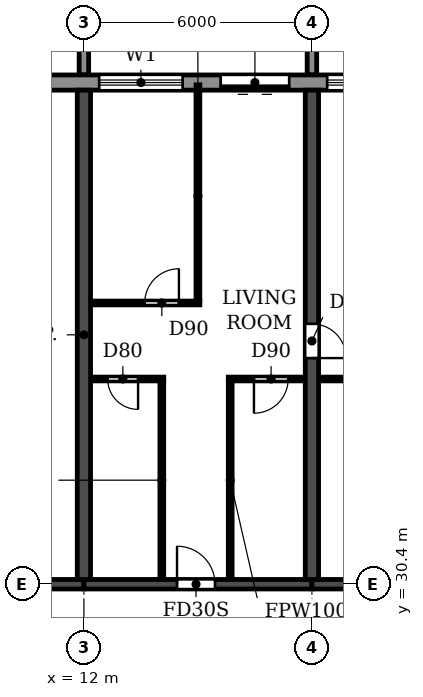
"""IFC4 building model, lengths in metres.
Left out: names, types, materials, properties, quantities, classifications, styles, units other than length and angle.
Written with IfcOpenShell. Run it as: python <this file> out.ifc"""

import sys

from ifc_helpers import new_model, si_unit, direction, frame, frame_2d, origin, place, context, subcontext, project, spatial, polyline, rectangle, outline, extrude, source, transform, mapped, element, fill, save


model = new_model("IFC4")
c1 = context("Model", 3, precision=1e-05, world=origin(), true_north=direction((0.0, 1.0)))
c2 = subcontext(c1, "Body", "Model", "MODEL_VIEW")
j1 = project(units=[si_unit("LENGTHUNIT", "METRE"), si_unit("PLANEANGLEUNIT", "RADIAN")], contexts=[c1])
p1 = place(None, origin())
s1 = spatial("IfcSite", under=j1, at=p1, CompositionType="ELEMENT")
p2 = place(p1, origin())
s2 = spatial("IfcBuilding", under=s1, at=p2, CompositionType="ELEMENT")
p3 = place(p2, frame((0.0, 0.0, 102.6)))
s3 = spatial("IfcBuildingStorey", under=s2, at=p3, CompositionType="ELEMENT", Elevation=102.6)
p4 = place(p3, frame((12.0, 30.525, 0.0), z_axis=(0.0, 0.0, 1.0), x_axis=(0.0, 1.0, 0.0)))
e1 = element("IfcWall", 1, at=p4, inside=s3, PredefinedType="SHEAR", context=c2, shape_type="SweptSolid", body=[
    extrude(rectangle(XDim=12.875, YDim=0.35, at=frame_2d((6.438, 0.0))), origin(), (0.0, 0.0, 1.0), 3.0),
])
p5 = place(p3, frame((18.0, 30.525, 0.0), z_axis=(0.0, 0.0, 1.0), x_axis=(0.0, 1.0, 0.0)))
e2 = element("IfcWall", 2, at=p5, inside=s3, PredefinedType="SHEAR", context=c2, shape_type="SweptSolid", body=[
    extrude(rectangle(XDim=12.875, YDim=0.35, at=frame_2d((6.438, 0.0))), origin(), (0.0, 0.0, 1.0), 3.0),
])
p6 = place(p5, frame((5.825, 0.0, 0.0)))
e3 = element("IfcOpeningElement", 3, at=p6, cuts=e2, PredefinedType="OPENING", context=c2, shape_type="SweptSolid", body=[
    extrude(rectangle(XDim=0.9, YDim=2.1, at=frame_2d((0.45, 1.05))), frame((0.0, 0.185, 0.0), z_axis=(0.0, -1.0, 0.0), x_axis=(1.0, 0.0, 0.0)), (0.0, 0.0, 1.0), 0.37),
])
p7 = place(p3, frame((6.2, 30.4, 0.0), z_axis=(0.0, 0.0, 1.0), x_axis=(1.0, 0.0, 0.0)))
e4 = element("IfcWall", 4, at=p7, inside=s3, PredefinedType="SHEAR", context=c2, shape_type="SweptSolid", body=[
    extrude(rectangle(XDim=5.8, YDim=0.25, at=frame_2d((2.9, 0.0))), origin(), (0.0, 0.0, 1.0), 2.4),
])
p8 = place(p7, frame((2.3, 0.0, 0.0)))
e5 = element("IfcOpeningElement", 5, at=p8, cuts=e4, PredefinedType="OPENING", context=c2, shape_type="SweptSolid", body=[
    extrude(rectangle(XDim=1.0, YDim=2.1, at=frame_2d((0.5, 1.05))), frame((0.0, 0.135, 0.0), z_axis=(0.0, -1.0, 0.0), x_axis=(1.0, 0.0, 0.0)), (0.0, 0.0, 1.0), 0.27),
])
p9 = place(p3, frame((12.0, 30.4, 0.0), z_axis=(0.0, 0.0, 1.0), x_axis=(1.0, 0.0, 0.0)))
e6 = element("IfcWall", 6, at=p9, inside=s3, PredefinedType="SHEAR", context=c2, shape_type="SweptSolid", body=[
    extrude(rectangle(XDim=6.0, YDim=0.25, at=frame_2d((3.0, 0.0))), origin(), (0.0, 0.0, 1.0), 2.4),
])
p10 = place(p9, frame((2.45, 0.0, 0.0)))
e7 = element("IfcOpeningElement", 7, at=p10, cuts=e6, PredefinedType="OPENING", context=c2, shape_type="SweptSolid", body=[
    extrude(rectangle(XDim=1.0, YDim=2.1, at=frame_2d((0.5, 1.05))), frame((0.0, 0.135, 0.0), z_axis=(0.0, -1.0, 0.0), x_axis=(1.0, 0.0, 0.0)), (0.0, 0.0, 1.0), 0.27),
])
p11 = place(p3, frame((18.0, 30.4, 0.0), z_axis=(0.0, 0.0, 1.0), x_axis=(1.0, 0.0, 0.0)))
e8 = element("IfcWall", 8, at=p11, inside=s3, PredefinedType="SHEAR", context=c2, shape_type="SweptSolid", body=[
    extrude(rectangle(XDim=6.0, YDim=0.25, at=frame_2d((3.0, 0.0))), origin(), (0.0, 0.0, 1.0), 2.4),
])
p12 = place(p3, frame((91.317, 43.6, 0.0), z_axis=(0.0, 0.0, 1.0), x_axis=(-1.0, 0.0, 0.0)))
e9 = element("IfcWall", 9, at=p12, inside=s3, PredefinedType="STANDARD", context=c2, shape_type="SweptSolid", body=[
    extrude(rectangle(XDim=80.634, YDim=0.4, at=frame_2d((40.317, 0.0))), origin(), (0.0, 0.0, 1.0), 3.0),
])
p13 = place(p12, frame((76.717, 0.0, 0.9)))
e10 = element("IfcOpeningElement", 10, at=p13, cuts=e9, PredefinedType="OPENING", context=c2, shape_type="SweptSolid", body=[
    extrude(rectangle(XDim=2.2, YDim=1.5, at=frame_2d((1.1, 0.75))), frame((0.0, 0.21, 0.0), z_axis=(0.0, -1.0, 0.0), x_axis=(1.0, 0.0, 0.0)), (0.0, 0.0, 1.0), 0.42),
])
p14 = place(p12, frame((73.917, 0.0, 0.0)))
e11 = element("IfcOpeningElement", 11, at=p14, cuts=e9, PredefinedType="OPENING", context=c2, shape_type="SweptSolid", body=[
    extrude(rectangle(XDim=1.8, YDim=2.4, at=frame_2d((0.9, 1.2))), frame((0.0, 0.21, 0.0), z_axis=(0.0, -1.0, 0.0), x_axis=(1.0, 0.0, 0.0)), (0.0, 0.0, 1.0), 0.42),
])
p15 = place(p12, frame((70.717, 0.0, 0.9)))
e12 = element("IfcOpeningElement", 12, at=p15, cuts=e9, PredefinedType="OPENING", context=c2, shape_type="SweptSolid", body=[
    extrude(rectangle(XDim=2.2, YDim=1.5, at=frame_2d((1.1, 0.75))), frame((0.0, 0.21, 0.0), z_axis=(0.0, -1.0, 0.0), x_axis=(1.0, 0.0, 0.0)), (0.0, 0.0, 1.0), 0.42),
])
p16 = place(p12, frame((67.717, 0.0, 0.9)))
e13 = element("IfcOpeningElement", 13, at=p16, cuts=e9, PredefinedType="OPENING", context=c2, shape_type="SweptSolid", body=[
    extrude(rectangle(XDim=2.2, YDim=1.5, at=frame_2d((1.1, 0.75))), frame((0.0, 0.21, 0.0), z_axis=(0.0, -1.0, 0.0), x_axis=(1.0, 0.0, 0.0)), (0.0, 0.0, 1.0), 0.42),
])
p17 = place(p12, frame((64.917, 0.0, 0.0)))
e14 = element("IfcOpeningElement", 14, at=p17, cuts=e9, PredefinedType="OPENING", context=c2, shape_type="SweptSolid", body=[
    extrude(rectangle(XDim=1.8, YDim=2.4, at=frame_2d((0.9, 1.2))), frame((0.0, 0.21, 0.0), z_axis=(0.0, -1.0, 0.0), x_axis=(1.0, 0.0, 0.0)), (0.0, 0.0, 1.0), 0.42),
])
p18 = place(p12, frame((61.717, 0.0, 0.9)))
e15 = element("IfcOpeningElement", 15, at=p18, cuts=e9, PredefinedType="OPENING", context=c2, shape_type="SweptSolid", body=[
    extrude(rectangle(XDim=2.2, YDim=1.5, at=frame_2d((1.1, 0.75))), frame((0.0, 0.21, 0.0), z_axis=(0.0, -1.0, 0.0), x_axis=(1.0, 0.0, 0.0)), (0.0, 0.0, 1.0), 0.42),
])
p19 = place(p12, frame((58.717, 0.0, 0.9)))
e16 = element("IfcOpeningElement", 16, at=p19, cuts=e9, PredefinedType="OPENING", context=c2, shape_type="SweptSolid", body=[
    extrude(rectangle(XDim=2.2, YDim=1.5, at=frame_2d((1.1, 0.75))), frame((0.0, 0.21, 0.0), z_axis=(0.0, -1.0, 0.0), x_axis=(1.0, 0.0, 0.0)), (0.0, 0.0, 1.0), 0.42),
])
p20 = place(p12, frame((55.717, 0.0, 0.9)))
e17 = element("IfcOpeningElement", 17, at=p20, cuts=e9, PredefinedType="OPENING", context=c2, shape_type="SweptSolid", body=[
    extrude(rectangle(XDim=2.2, YDim=1.5, at=frame_2d((1.1, 0.75))), frame((0.0, 0.21, 0.0), z_axis=(0.0, -1.0, 0.0), x_axis=(1.0, 0.0, 0.0)), (0.0, 0.0, 1.0), 0.42),
])
p21 = place(p12, frame((52.717, 0.0, 0.9)))
e18 = element("IfcOpeningElement", 18, at=p21, cuts=e9, PredefinedType="OPENING", context=c2, shape_type="SweptSolid", body=[
    extrude(rectangle(XDim=2.2, YDim=1.5, at=frame_2d((1.1, 0.75))), frame((0.0, 0.21, 0.0), z_axis=(0.0, -1.0, 0.0), x_axis=(1.0, 0.0, 0.0)), (0.0, 0.0, 1.0), 0.42),
])
p22 = place(p12, frame((49.917, 0.0, 0.0)))
e19 = element("IfcOpeningElement", 19, at=p22, cuts=e9, PredefinedType="OPENING", context=c2, shape_type="SweptSolid", body=[
    extrude(rectangle(XDim=1.8, YDim=2.4, at=frame_2d((0.9, 1.2))), frame((0.0, 0.21, 0.0), z_axis=(0.0, -1.0, 0.0), x_axis=(1.0, 0.0, 0.0)), (0.0, 0.0, 1.0), 0.42),
])
p23 = place(p12, frame((46.717, 0.0, 0.9)))
e20 = element("IfcOpeningElement", 20, at=p23, cuts=e9, PredefinedType="OPENING", context=c2, shape_type="SweptSolid", body=[
    extrude(rectangle(XDim=2.2, YDim=1.5, at=frame_2d((1.1, 0.75))), frame((0.0, 0.21, 0.0), z_axis=(0.0, -1.0, 0.0), x_axis=(1.0, 0.0, 0.0)), (0.0, 0.0, 1.0), 0.42),
])
p24 = place(p12, frame((43.917, 0.0, 0.0)))
e21 = element("IfcOpeningElement", 21, at=p24, cuts=e9, PredefinedType="OPENING", context=c2, shape_type="SweptSolid", body=[
    extrude(rectangle(XDim=1.8, YDim=2.4, at=frame_2d((0.9, 1.2))), frame((0.0, 0.21, 0.0), z_axis=(0.0, -1.0, 0.0), x_axis=(1.0, 0.0, 0.0)), (0.0, 0.0, 1.0), 0.42),
])
p25 = place(p12, frame((40.717, 0.0, 0.9)))
e22 = element("IfcOpeningElement", 22, at=p25, cuts=e9, PredefinedType="OPENING", context=c2, shape_type="SweptSolid", body=[
    extrude(rectangle(XDim=2.2, YDim=1.5, at=frame_2d((1.1, 0.75))), frame((0.0, 0.21, 0.0), z_axis=(0.0, -1.0, 0.0), x_axis=(1.0, 0.0, 0.0)), (0.0, 0.0, 1.0), 0.42),
])
p26 = place(p12, frame((37.717, 0.0, 0.9)))
e23 = element("IfcOpeningElement", 23, at=p26, cuts=e9, PredefinedType="OPENING", context=c2, shape_type="SweptSolid", body=[
    extrude(rectangle(XDim=2.2, YDim=1.5, at=frame_2d((1.1, 0.75))), frame((0.0, 0.21, 0.0), z_axis=(0.0, -1.0, 0.0), x_axis=(1.0, 0.0, 0.0)), (0.0, 0.0, 1.0), 0.42),
])
p27 = place(p12, frame((34.917, 0.0, 0.0)))
e24 = element("IfcOpeningElement", 24, at=p27, cuts=e9, PredefinedType="OPENING", context=c2, shape_type="SweptSolid", body=[
    extrude(rectangle(XDim=1.8, YDim=2.4, at=frame_2d((0.9, 1.2))), frame((0.0, 0.21, 0.0), z_axis=(0.0, -1.0, 0.0), x_axis=(1.0, 0.0, 0.0)), (0.0, 0.0, 1.0), 0.42),
])
p28 = place(p12, frame((31.717, 0.0, 0.9)))
e25 = element("IfcOpeningElement", 25, at=p28, cuts=e9, PredefinedType="OPENING", context=c2, shape_type="SweptSolid", body=[
    extrude(rectangle(XDim=2.2, YDim=1.5, at=frame_2d((1.1, 0.75))), frame((0.0, 0.21, 0.0), z_axis=(0.0, -1.0, 0.0), x_axis=(1.0, 0.0, 0.0)), (0.0, 0.0, 1.0), 0.42),
])
p29 = place(p12, frame((28.717, 0.0, 0.9)))
e26 = element("IfcOpeningElement", 26, at=p29, cuts=e9, PredefinedType="OPENING", context=c2, shape_type="SweptSolid", body=[
    extrude(rectangle(XDim=2.2, YDim=1.5, at=frame_2d((1.1, 0.75))), frame((0.0, 0.21, 0.0), z_axis=(0.0, -1.0, 0.0), x_axis=(1.0, 0.0, 0.0)), (0.0, 0.0, 1.0), 0.42),
])
p30 = place(p12, frame((25.917, 0.0, 0.0)))
e27 = element("IfcOpeningElement", 27, at=p30, cuts=e9, PredefinedType="OPENING", context=c2, shape_type="SweptSolid", body=[
    extrude(rectangle(XDim=1.8, YDim=2.4, at=frame_2d((0.9, 1.2))), frame((0.0, 0.21, 0.0), z_axis=(0.0, -1.0, 0.0), x_axis=(1.0, 0.0, 0.0)), (0.0, 0.0, 1.0), 0.42),
])
p31 = place(p12, frame((22.717, 0.0, 0.9)))
e28 = element("IfcOpeningElement", 28, at=p31, cuts=e9, PredefinedType="OPENING", context=c2, shape_type="SweptSolid", body=[
    extrude(rectangle(XDim=2.2, YDim=1.5, at=frame_2d((1.1, 0.75))), frame((0.0, 0.21, 0.0), z_axis=(0.0, -1.0, 0.0), x_axis=(1.0, 0.0, 0.0)), (0.0, 0.0, 1.0), 0.42),
])
p32 = place(p12, frame((19.717, 0.0, 0.9)))
e29 = element("IfcOpeningElement", 29, at=p32, cuts=e9, PredefinedType="OPENING", context=c2, shape_type="SweptSolid", body=[
    extrude(rectangle(XDim=2.2, YDim=1.5, at=frame_2d((1.1, 0.75))), frame((0.0, 0.21, 0.0), z_axis=(0.0, -1.0, 0.0), x_axis=(1.0, 0.0, 0.0)), (0.0, 0.0, 1.0), 0.42),
])
p33 = place(p12, frame((16.917, 0.0, 0.0)))
e30 = element("IfcOpeningElement", 30, at=p33, cuts=e9, PredefinedType="OPENING", context=c2, shape_type="SweptSolid", body=[
    extrude(rectangle(XDim=1.8, YDim=2.4, at=frame_2d((0.9, 1.2))), frame((0.0, 0.21, 0.0), z_axis=(0.0, -1.0, 0.0), x_axis=(1.0, 0.0, 0.0)), (0.0, 0.0, 1.0), 0.42),
])
p34 = place(p12, frame((13.717, 0.0, 0.9)))
e31 = element("IfcOpeningElement", 31, at=p34, cuts=e9, PredefinedType="OPENING", context=c2, shape_type="SweptSolid", body=[
    extrude(rectangle(XDim=2.2, YDim=1.5, at=frame_2d((1.1, 0.75))), frame((0.0, 0.21, 0.0), z_axis=(0.0, -1.0, 0.0), x_axis=(1.0, 0.0, 0.0)), (0.0, 0.0, 1.0), 0.42),
])
p35 = place(p12, frame((10.917, 0.0, 0.0)))
e32 = element("IfcOpeningElement", 32, at=p35, cuts=e9, PredefinedType="OPENING", context=c2, shape_type="SweptSolid", body=[
    extrude(rectangle(XDim=1.8, YDim=2.4, at=frame_2d((0.9, 1.2))), frame((0.0, 0.21, 0.0), z_axis=(0.0, -1.0, 0.0), x_axis=(1.0, 0.0, 0.0)), (0.0, 0.0, 1.0), 0.42),
])
p36 = place(p12, frame((7.717, 0.0, 0.9)))
e33 = element("IfcOpeningElement", 33, at=p36, cuts=e9, PredefinedType="OPENING", context=c2, shape_type="SweptSolid", body=[
    extrude(rectangle(XDim=2.2, YDim=1.5, at=frame_2d((1.1, 0.75))), frame((0.0, 0.21, 0.0), z_axis=(0.0, -1.0, 0.0), x_axis=(1.0, 0.0, 0.0)), (0.0, 0.0, 1.0), 0.42),
])
p37 = place(p12, frame((4.717, 0.0, 0.9)))
e34 = element("IfcOpeningElement", 34, at=p37, cuts=e9, PredefinedType="OPENING", context=c2, shape_type="SweptSolid", body=[
    extrude(rectangle(XDim=2.2, YDim=1.5, at=frame_2d((1.1, 0.75))), frame((0.0, 0.21, 0.0), z_axis=(0.0, -1.0, 0.0), x_axis=(1.0, 0.0, 0.0)), (0.0, 0.0, 1.0), 0.42),
])
p38 = place(p12, frame((1.917, 0.0, 0.0)))
e35 = element("IfcOpeningElement", 35, at=p38, cuts=e9, PredefinedType="OPENING", context=c2, shape_type="SweptSolid", body=[
    extrude(rectangle(XDim=1.8, YDim=2.4, at=frame_2d((0.9, 1.2))), frame((0.0, 0.21, 0.0), z_axis=(0.0, -1.0, 0.0), x_axis=(1.0, 0.0, 0.0)), (0.0, 0.0, 1.0), 0.42),
])
m1 = source(origin(), c2, "Body", "SweptSolid", [
    extrude(outline(polyline([(0.0, 0.0), (0.25, 0.0), (0.25, 3.1), (0.0, 3.1), (0.0, 0.0)])), origin(), (0.0, 0.0, 1.0), 3.1),
])
for number, where in (
    (36, (11.875, 43.8, 0.0)),
    (37, (17.875, 43.8, 0.0)),
):
    element("IfcWall", number, at=place(p3, frame(where)), inside=s3, PredefinedType="STANDARD", context=c2, shape_type="MappedRepresentation", body=[
        mapped(m1, transform((0.0, 0.0, 0.0))),
    ])
p39 = place(p3, frame((12.185, 35.8, 0.0), z_axis=(0.0, 0.0, 1.0), x_axis=(1.0, 0.0, 0.0)))
e38 = element("IfcWall", 38, at=p39, inside=s3, PredefinedType="PARTITIONING", context=c2, shape_type="SweptSolid", body=[
    extrude(rectangle(XDim=1.915, YDim=0.1, at=frame_2d((0.958, 0.0))), origin(), (0.0, 0.0, 1.0), 3.0),
])
p40 = place(p39, frame((0.44, 0.0, 0.0)))
e39 = element("IfcOpeningElement", 39, at=p40, cuts=e38, PredefinedType="OPENING", context=c2, shape_type="SweptSolid", body=[
    extrude(rectangle(XDim=0.8, YDim=2.1, at=frame_2d((0.4, 1.05))), frame((0.0, 0.06, 0.0), z_axis=(0.0, -1.0, 0.0), x_axis=(1.0, 0.0, 0.0)), (0.0, 0.0, 1.0), 0.12),
])
p41 = place(p3, frame((15.8, 35.8, 0.0), z_axis=(0.0, 0.0, 1.0), x_axis=(1.0, 0.0, 0.0)))
e40 = element("IfcWall", 40, at=p41, inside=s3, PredefinedType="PARTITIONING", context=c2, shape_type="SweptSolid", body=[
    extrude(rectangle(XDim=2.015, YDim=0.1, at=frame_2d((1.007, 0.0))), origin(), (0.0, 0.0, 1.0), 3.0),
])
p42 = place(p41, frame((0.675, 0.0, 0.0)))
e41 = element("IfcOpeningElement", 41, at=p42, cuts=e40, PredefinedType="OPENING", context=c2, shape_type="SweptSolid", body=[
    extrude(rectangle(XDim=0.9, YDim=2.1, at=frame_2d((0.45, 1.05))), frame((0.0, 0.06, 0.0), z_axis=(0.0, -1.0, 0.0), x_axis=(1.0, 0.0, 0.0)), (0.0, 0.0, 1.0), 0.12),
])
p43 = place(p3, frame((18.185, 35.8, 0.0), z_axis=(0.0, 0.0, 1.0), x_axis=(1.0, 0.0, 0.0)))
e42 = element("IfcWall", 42, at=p43, inside=s3, PredefinedType="PARTITIONING", context=c2, shape_type="SweptSolid", body=[
    extrude(rectangle(XDim=2.715, YDim=0.1, at=frame_2d((1.357, 0.0))), origin(), (0.0, 0.0, 1.0), 3.0),
])
p44 = place(p43, frame((0.915, 0.0, 0.0)))
e43 = element("IfcOpeningElement", 43, at=p44, cuts=e42, PredefinedType="OPENING", context=c2, shape_type="SweptSolid", body=[
    extrude(rectangle(XDim=0.8, YDim=2.1, at=frame_2d((0.4, 1.05))), frame((0.0, 0.06, 0.0), z_axis=(0.0, -1.0, 0.0), x_axis=(1.0, 0.0, 0.0)), (0.0, 0.0, 1.0), 0.12),
])
p45 = place(p3, frame((12.185, 37.8, 0.0), z_axis=(0.0, 0.0, 1.0), x_axis=(1.0, 0.0, 0.0)))
e44 = element("IfcWall", 44, at=p45, inside=s3, PredefinedType="PARTITIONING", context=c2, shape_type="SweptSolid", body=[
    extrude(rectangle(XDim=2.865, YDim=0.1, at=frame_2d((1.433, 0.0))), origin(), (0.0, 0.0, 1.0), 3.0),
])
p46 = place(p45, frame((1.415, 0.0, 0.0)))
e45 = element("IfcOpeningElement", 45, at=p46, cuts=e44, PredefinedType="OPENING", context=c2, shape_type="SweptSolid", body=[
    extrude(rectangle(XDim=0.9, YDim=2.1, at=frame_2d((0.45, 1.05))), frame((0.0, 0.06, 0.0), z_axis=(0.0, -1.0, 0.0), x_axis=(1.0, 0.0, 0.0)), (0.0, 0.0, 1.0), 0.12),
])
p47 = place(p3, frame((14.05, 30.535, 0.0), z_axis=(0.0, 0.0, 1.0), x_axis=(0.0, 1.0, 0.0)))
e46 = element("IfcWall", 46, at=p47, inside=s3, PredefinedType="PARTITIONING", context=c2, shape_type="SweptSolid", body=[
    extrude(rectangle(XDim=5.215, YDim=0.1, at=frame_2d((2.607, 0.0))), origin(), (0.0, 0.0, 1.0), 3.0),
])
p48 = place(p3, frame((15.0, 37.85, 0.0), z_axis=(0.0, 0.0, 1.0), x_axis=(0.0, 1.0, 0.0)))
e47 = element("IfcWall", 47, at=p48, inside=s3, PredefinedType="PARTITIONING", context=c2, shape_type="SweptSolid", body=[
    extrude(rectangle(XDim=5.69, YDim=0.1, at=frame_2d((2.845, 0.0))), origin(), (0.0, 0.0, 1.0), 3.0),
])
p49 = place(p3, frame((15.85, 30.535, 0.0), z_axis=(0.0, 0.0, 1.0), x_axis=(0.0, 1.0, 0.0)))
e48 = element("IfcWall", 48, at=p49, inside=s3, PredefinedType="PARTITIONING", context=c2, shape_type="SweptSolid", body=[
    extrude(rectangle(XDim=5.215, YDim=0.1, at=frame_2d((2.607, 0.0))), origin(), (0.0, 0.0, 1.0), 3.0),
])
p50 = place(p13, origin())
e49 = element("IfcWindow", 49, at=p50, inside=s3, PartitioningType="DOUBLE_PANEL_HORIZONTAL", PredefinedType="WINDOW", context=c2, shape_type="SweptSolid", body=[
    extrude(rectangle(XDim=2.2, YDim=1.5, at=frame_2d((1.1, 0.75))), frame((0.0, 0.03, 0.0), z_axis=(0.0, -1.0, 0.0), x_axis=(1.0, 0.0, 0.0)), (0.0, 0.0, 1.0), 0.06),
])
fill(e10, e49)
p51 = place(p14, origin())
e50 = element("IfcDoor", 50, at=p51, inside=s3, OperationType="DOUBLE_DOOR_SLIDING", PredefinedType="DOOR", context=c2, shape_type="SweptSolid", body=[
    extrude(rectangle(XDim=1.8, YDim=2.4, at=frame_2d((0.9, 1.2))), frame((0.0, 0.025, 0.0), z_axis=(0.0, -1.0, 0.0), x_axis=(1.0, 0.0, 0.0)), (0.0, 0.0, 1.0), 0.05),
])
fill(e11, e50)
p52 = place(p15, origin())
e51 = element("IfcWindow", 51, at=p52, inside=s3, PartitioningType="DOUBLE_PANEL_HORIZONTAL", PredefinedType="WINDOW", context=c2, shape_type="SweptSolid", body=[
    extrude(rectangle(XDim=2.2, YDim=1.5, at=frame_2d((1.1, 0.75))), frame((0.0, 0.03, 0.0), z_axis=(0.0, -1.0, 0.0), x_axis=(1.0, 0.0, 0.0)), (0.0, 0.0, 1.0), 0.06),
])
fill(e12, e51)
p53 = place(p40, frame((0.8, 0.0, 0.0), z_axis=(0.0, 0.0, 1.0), x_axis=(-1.0, 0.0, 0.0)))
e52 = element("IfcDoor", 52, at=p53, inside=s3, OperationType="SINGLE_SWING_LEFT", PredefinedType="DOOR", context=c2, shape_type="SweptSolid", body=[
    extrude(rectangle(XDim=0.8, YDim=2.1, at=frame_2d((0.4, 1.05))), frame((0.0, 0.025, 0.0), z_axis=(0.0, -1.0, 0.0), x_axis=(1.0, 0.0, 0.0)), (0.0, 0.0, 1.0), 0.05),
])
fill(e39, e52)
p54 = place(p46, origin())
e53 = element("IfcDoor", 53, at=p54, inside=s3, OperationType="SINGLE_SWING_RIGHT", PredefinedType="DOOR", context=c2, shape_type="SweptSolid", body=[
    extrude(rectangle(XDim=0.9, YDim=2.1, at=frame_2d((0.45, 1.05))), frame((0.0, 0.025, 0.0), z_axis=(0.0, -1.0, 0.0), x_axis=(1.0, 0.0, 0.0)), (0.0, 0.0, 1.0), 0.05),
])
fill(e45, e53)
p55 = place(p10, origin())
e54 = element("IfcDoor", 54, at=p55, inside=s3, OperationType="SINGLE_SWING_LEFT", PredefinedType="DOOR", context=c2, shape_type="SweptSolid", body=[
    extrude(rectangle(XDim=1.0, YDim=2.1, at=frame_2d((0.5, 1.05))), frame((0.0, 0.025, 0.0), z_axis=(0.0, -1.0, 0.0), x_axis=(1.0, 0.0, 0.0)), (0.0, 0.0, 1.0), 0.05),
])
fill(e7, e54)
p56 = place(p42, frame((0.9, 0.0, 0.0), z_axis=(0.0, 0.0, 1.0), x_axis=(-1.0, 0.0, 0.0)))
e55 = element("IfcDoor", 55, at=p56, inside=s3, OperationType="SINGLE_SWING_RIGHT", PredefinedType="DOOR", context=c2, shape_type="SweptSolid", body=[
    extrude(rectangle(XDim=0.9, YDim=2.1, at=frame_2d((0.45, 1.05))), frame((0.0, 0.025, 0.0), z_axis=(0.0, -1.0, 0.0), x_axis=(1.0, 0.0, 0.0)), (0.0, 0.0, 1.0), 0.05),
])
fill(e41, e55)
p57 = place(p6, frame((0.9, 0.0, 0.0), z_axis=(0.0, 0.0, 1.0), x_axis=(-1.0, 0.0, 0.0)))
e56 = element("IfcDoor", 56, at=p57, inside=s3, OperationType="SINGLE_SWING_RIGHT", PredefinedType="DOOR", context=c2, shape_type="SweptSolid", body=[
    extrude(rectangle(XDim=0.9, YDim=2.1, at=frame_2d((0.45, 1.05))), frame((0.0, 0.025, 0.0), z_axis=(0.0, -1.0, 0.0), x_axis=(1.0, 0.0, 0.0)), (0.0, 0.0, 1.0), 0.05),
])
fill(e3, e56)
save(model, sys.argv[1])
